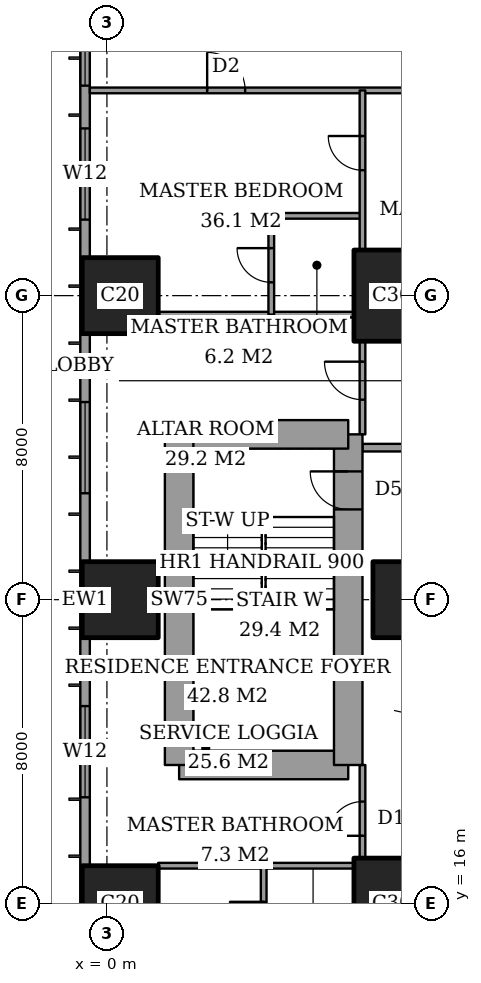
"""IFC4 building model, lengths in metres.
Left out: names, types, materials, properties, quantities, classifications, styles, units other than length and angle.
Written with IfcOpenShell. Run it as: python <this file> out.ifc"""

import sys

from ifc_helpers import new_model, si_unit, direction, frame, frame_2d, origin, origin_2d, place, context, subcontext, project, spatial, rectangle, extrude, element, fill, save


model = new_model("IFC4")
c1 = context("Model", 3, precision=1e-05, world=origin(), true_north=direction((0.0, 1.0)))
c2 = subcontext(c1, "Body", "Model", "MODEL_VIEW")
j1 = project(units=[si_unit("LENGTHUNIT", "METRE"), si_unit("PLANEANGLEUNIT", "RADIAN")], contexts=[c1])
p1 = place(None, origin())
s1 = spatial("IfcSite", under=j1, at=p1, CompositionType="ELEMENT")
p2 = place(p1, origin())
s2 = spatial("IfcBuilding", under=s1, at=p2, CompositionType="ELEMENT")
p3 = place(p2, frame((0.0, 0.0, 150.2)))
s3 = spatial("IfcBuildingStorey", under=s2, at=p3, CompositionType="ELEMENT", Elevation=150.2)
for number, where, z_axis, x_axis in (
    (1, (0.35, 16.0, 0.0), (0.0, 0.0, 1.0), (1.0, 0.0, 0.0)),
    (2, (0.35, 24.0, 0.0), (0.0, 0.0, 1.0), (1.0, 0.0, 0.0)),
    (3, (0.35, 32.0, 0.0), (0.0, 0.0, 1.0), (1.0, 0.0, 0.0)),
):
    element("IfcColumn", number, at=place(p3, frame(where, z_axis=z_axis, x_axis=x_axis)), inside=s3, PredefinedType="COLUMN", context=c2, shape_type="SweptSolid", body=[
        extrude(rectangle(XDim=2.0, YDim=2.0, at=origin_2d()), origin(), (0.0, 0.0, 1.0), 3.6),
    ])
p4 = place(p3, frame((8.0, 16.0, 0.0), z_axis=(0.0, 0.0, 1.0), x_axis=(1.0, 0.0, 0.0)))
e4 = element("IfcColumn", 4, at=p4, inside=s3, PredefinedType="COLUMN", context=c2, shape_type="SweptSolid", body=[
    extrude(rectangle(XDim=3.0, YDim=2.4, at=origin_2d()), origin(), (0.0, 0.0, 1.0), 3.6),
])
p5 = place(p3, frame((8.0, 24.0, 0.0), z_axis=(0.0, 0.0, 1.0), x_axis=(1.0, 0.0, 0.0)))
e5 = element("IfcColumn", 5, at=p5, inside=s3, PredefinedType="COLUMN", context=c2, shape_type="SweptSolid", body=[
    extrude(rectangle(XDim=2.0, YDim=2.0, at=origin_2d()), origin(), (0.0, 0.0, 1.0), 3.6),
])
p6 = place(p3, frame((8.0, 32.0, 0.0), z_axis=(0.0, 0.0, 1.0), x_axis=(1.0, 0.0, 0.0)))
e6 = element("IfcColumn", 6, at=p6, inside=s3, PredefinedType="COLUMN", context=c2, shape_type="SweptSolid", body=[
    extrude(rectangle(XDim=3.0, YDim=2.4, at=origin_2d()), origin(), (0.0, 0.0, 1.0), 3.6),
])
p7 = place(p3, frame((1.9, 19.65, 0.0), z_axis=(0.0, 0.0, 1.0), x_axis=(1.0, 0.0, 0.0)))
e7 = element("IfcWall", 7, at=p7, inside=s3, PredefinedType="SHEAR", context=c2, shape_type="SweptSolid", body=[
    extrude(rectangle(XDim=4.45, YDim=0.75, at=frame_2d((2.225, 0.0))), origin(), (0.0, 0.0, 1.0), 3.6),
])
p8 = place(p3, frame((6.35, 19.65, 0.0), z_axis=(0.0, 0.0, 1.0), x_axis=(0.0, 1.0, 0.0)))
e8 = element("IfcWall", 8, at=p8, inside=s3, PredefinedType="SHEAR", context=c2, shape_type="SweptSolid", body=[
    extrude(rectangle(XDim=8.7, YDim=0.75, at=frame_2d((4.35, 0.0))), origin(), (0.0, 0.0, 1.0), 3.6),
])
p9 = place(p8, frame((6.725, 0.0, 0.0)))
e9 = element("IfcOpeningElement", 9, at=p9, cuts=e8, PredefinedType="OPENING", context=c2, shape_type="SweptSolid", body=[
    extrude(rectangle(XDim=1.0, YDim=2.1, at=frame_2d((0.5, 1.05))), frame((0.0, 0.385, 0.0), z_axis=(0.0, -1.0, 0.0), x_axis=(1.0, 0.0, 0.0)), (0.0, 0.0, 1.0), 0.77),
])
p10 = place(p3, frame((6.35, 28.35, 0.0), z_axis=(0.0, 0.0, 1.0), x_axis=(-1.0, 0.0, 0.0)))
e10 = element("IfcWall", 10, at=p10, inside=s3, PredefinedType="SHEAR", context=c2, shape_type="SweptSolid", body=[
    extrude(rectangle(XDim=4.45, YDim=0.75, at=frame_2d((2.225, 0.0))), origin(), (0.0, 0.0, 1.0), 3.6),
])
p11 = place(p3, frame((1.9, 28.35, 0.0), z_axis=(0.0, 0.0, 1.0), x_axis=(0.0, -1.0, 0.0)))
e11 = element("IfcWall", 11, at=p11, inside=s3, PredefinedType="SHEAR", context=c2, shape_type="SweptSolid", body=[
    extrude(rectangle(XDim=8.7, YDim=0.75, at=frame_2d((4.35, 0.0))), origin(), (0.0, 0.0, 1.0), 3.6),
])
p12 = place(p3, frame((-0.575, 44.825, 0.0), z_axis=(0.0, 0.0, 1.0), x_axis=(0.0, -1.0, 0.0)))
e12 = element("IfcWall", 12, at=p12, inside=s3, PredefinedType="SOLIDWALL", context=c2, shape_type="SweptSolid", body=[
    extrude(rectangle(XDim=41.65, YDim=0.25, at=frame_2d((20.825, 0.0))), origin(), (0.0, 0.0, 1.0), 3.6),
])
p13 = place(p12, frame((0.775, 0.0, 0.4)))
e13 = element("IfcOpeningElement", 13, at=p13, cuts=e12, PredefinedType="OPENING", context=c2, shape_type="SweptSolid", body=[
    extrude(rectangle(XDim=2.4, YDim=2.2, at=frame_2d((1.2, 1.1))), frame((0.0, 0.135, 0.0), z_axis=(0.0, -1.0, 0.0), x_axis=(1.0, 0.0, 0.0)), (0.0, 0.0, 1.0), 0.27),
])
p14 = place(p12, frame((6.1, 0.0, 0.4)))
e14 = element("IfcOpeningElement", 14, at=p14, cuts=e12, PredefinedType="OPENING", context=c2, shape_type="SweptSolid", body=[
    extrude(rectangle(XDim=1.2, YDim=2.2, at=frame_2d((0.6, 1.1))), frame((0.0, 0.135, 0.0), z_axis=(0.0, -1.0, 0.0), x_axis=(1.0, 0.0, 0.0)), (0.0, 0.0, 1.0), 0.27),
])
p15 = place(p12, frame((8.425, 0.0, 0.4)))
e15 = element("IfcOpeningElement", 15, at=p15, cuts=e12, PredefinedType="OPENING", context=c2, shape_type="SweptSolid", body=[
    extrude(rectangle(XDim=2.4, YDim=2.2, at=frame_2d((1.2, 1.1))), frame((0.0, 0.135, 0.0), z_axis=(0.0, -1.0, 0.0), x_axis=(1.0, 0.0, 0.0)), (0.0, 0.0, 1.0), 0.27),
])
p16 = place(p12, frame((15.625, 0.0, 0.4)))
e16 = element("IfcOpeningElement", 16, at=p16, cuts=e12, PredefinedType="OPENING", context=c2, shape_type="SweptSolid", body=[
    extrude(rectangle(XDim=2.4, YDim=2.2, at=frame_2d((1.2, 1.1))), frame((0.0, 0.135, 0.0), z_axis=(0.0, -1.0, 0.0), x_axis=(1.0, 0.0, 0.0)), (0.0, 0.0, 1.0), 0.27),
])
p17 = place(p12, frame((23.625, 0.0, 0.4)))
e17 = element("IfcOpeningElement", 17, at=p17, cuts=e12, PredefinedType="OPENING", context=c2, shape_type="SweptSolid", body=[
    extrude(rectangle(XDim=2.4, YDim=2.2, at=frame_2d((1.2, 1.1))), frame((0.0, 0.135, 0.0), z_axis=(0.0, -1.0, 0.0), x_axis=(1.0, 0.0, 0.0)), (0.0, 0.0, 1.0), 0.27),
])
p18 = place(p12, frame((30.625, 0.0, 0.4)))
e18 = element("IfcOpeningElement", 18, at=p18, cuts=e12, PredefinedType="OPENING", context=c2, shape_type="SweptSolid", body=[
    extrude(rectangle(XDim=2.4, YDim=2.2, at=frame_2d((1.2, 1.1))), frame((0.0, 0.135, 0.0), z_axis=(0.0, -1.0, 0.0), x_axis=(1.0, 0.0, 0.0)), (0.0, 0.0, 1.0), 0.27),
])
p19 = place(p12, frame((34.225, 0.0, 0.4)))
e19 = element("IfcOpeningElement", 19, at=p19, cuts=e12, PredefinedType="OPENING", context=c2, shape_type="SweptSolid", body=[
    extrude(rectangle(XDim=1.2, YDim=2.2, at=frame_2d((0.6, 1.1))), frame((0.0, 0.135, 0.0), z_axis=(0.0, -1.0, 0.0), x_axis=(1.0, 0.0, 0.0)), (0.0, 0.0, 1.0), 0.27),
])
p20 = place(p12, frame((38.475, 0.0, 0.4)))
e20 = element("IfcOpeningElement", 20, at=p20, cuts=e12, PredefinedType="OPENING", context=c2, shape_type="SweptSolid", body=[
    extrude(rectangle(XDim=2.4, YDim=2.2, at=frame_2d((1.2, 1.1))), frame((0.0, 0.135, 0.0), z_axis=(0.0, -1.0, 0.0), x_axis=(1.0, 0.0, 0.0)), (0.0, 0.0, 1.0), 0.27),
])
p21 = place(p3, frame((1.35, 17.0, 0.0), z_axis=(0.0, 0.0, 1.0), x_axis=(1.0, 0.0, 0.0)))
e21 = element("IfcWall", 21, at=p21, inside=s3, PredefinedType="PARTITIONING", context=c2, shape_type="SweptSolid", body=[
    extrude(rectangle(XDim=5.15, YDim=0.15, at=frame_2d((2.575, 0.0))), origin(), (0.0, 0.0, 1.0), 3.35),
])
p22 = place(p3, frame((6.725, 28.0, 0.0), z_axis=(0.0, 0.0, 1.0), x_axis=(1.0, 0.0, 0.0)))
e22 = element("IfcWall", 22, at=p22, inside=s3, PredefinedType="PARTITIONING", context=c2, shape_type="SweptSolid", body=[
    extrude(rectangle(XDim=17.275, YDim=0.2, at=frame_2d((8.637, 0.0))), origin(), (0.0, 0.0, 1.0), 3.35),
])
p23 = place(p22, frame((6.475, 0.0, 0.0)))
e23 = element("IfcOpeningElement", 23, at=p23, cuts=e22, PredefinedType="OPENING", context=c2, shape_type="SweptSolid", body=[
    extrude(rectangle(XDim=1.2, YDim=2.4, at=frame_2d((0.6, 1.2))), frame((0.0, 0.11, 0.0), z_axis=(0.0, -1.0, 0.0), x_axis=(1.0, 0.0, 0.0)), (0.0, 0.0, 1.0), 0.22),
])
p24 = place(p3, frame((1.35, 31.5, 0.0), z_axis=(0.0, 0.0, 1.0), x_axis=(1.0, 0.0, 0.0)))
e24 = element("IfcWall", 24, at=p24, inside=s3, PredefinedType="PARTITIONING", context=c2, shape_type="SweptSolid", body=[
    extrude(rectangle(XDim=5.15, YDim=0.15, at=frame_2d((2.575, 0.0))), origin(), (0.0, 0.0, 1.0), 3.35),
])
p25 = place(p3, frame((4.325, 34.1, 0.0), z_axis=(0.0, 0.0, 1.0), x_axis=(1.0, 0.0, 0.0)))
e25 = element("IfcWall", 25, at=p25, inside=s3, PredefinedType="PARTITIONING", context=c2, shape_type="SweptSolid", body=[
    extrude(rectangle(XDim=2.4, YDim=0.15, at=frame_2d((1.2, 0.0))), origin(), (0.0, 0.0, 1.0), 3.35),
])
p26 = place(p3, frame((-0.45, 37.4, 0.0), z_axis=(0.0, 0.0, 1.0), x_axis=(1.0, 0.0, 0.0)))
e26 = element("IfcWall", 26, at=p26, inside=s3, PredefinedType="PARTITIONING", context=c2, shape_type="SweptSolid", body=[
    extrude(rectangle(XDim=25.011, YDim=0.15, at=frame_2d((12.505, 0.0))), origin(), (0.0, 0.0, 1.0), 3.35),
])
p27 = place(p26, frame((10.65, 0.0, 0.0)))
e27 = element("IfcOpeningElement", 27, at=p27, cuts=e26, PredefinedType="OPENING", context=c2, shape_type="SweptSolid", body=[
    extrude(rectangle(XDim=1.0, YDim=2.1, at=frame_2d((0.5, 1.05))), frame((0.0, 0.085, 0.0), z_axis=(0.0, -1.0, 0.0), x_axis=(1.0, 0.0, 0.0)), (0.0, 0.0, 1.0), 0.17),
])
p28 = place(p26, frame((3.087, 0.0, 0.0)))
e28 = element("IfcOpeningElement", 28, at=p28, cuts=e26, PredefinedType="OPENING", context=c2, shape_type="SweptSolid", body=[
    extrude(rectangle(XDim=1.0, YDim=2.1, at=frame_2d((0.5, 1.05))), frame((0.0, 0.085, 0.0), z_axis=(0.0, -1.0, 0.0), x_axis=(1.0, 0.0, 0.0)), (0.0, 0.0, 1.0), 0.17),
])
p29 = place(p26, frame((13.45, 0.0, 0.0)))
e29 = element("IfcOpeningElement", 29, at=p29, cuts=e26, PredefinedType="OPENING", context=c2, shape_type="SweptSolid", body=[
    extrude(rectangle(XDim=1.0, YDim=2.1, at=frame_2d((0.5, 1.05))), frame((0.0, 0.085, 0.0), z_axis=(0.0, -1.0, 0.0), x_axis=(1.0, 0.0, 0.0)), (0.0, 0.0, 1.0), 0.17),
])
p30 = place(p26, frame((16.55, 0.0, 0.0)))
e30 = element("IfcOpeningElement", 30, at=p30, cuts=e26, PredefinedType="OPENING", context=c2, shape_type="SweptSolid", body=[
    extrude(rectangle(XDim=1.0, YDim=2.1, at=frame_2d((0.5, 1.05))), frame((0.0, 0.085, 0.0), z_axis=(0.0, -1.0, 0.0), x_axis=(1.0, 0.0, 0.0)), (0.0, 0.0, 1.0), 0.17),
])
p31 = place(p26, frame((21.175, 0.0, 0.0)))
e31 = element("IfcOpeningElement", 31, at=p31, cuts=e26, PredefinedType="OPENING", context=c2, shape_type="SweptSolid", body=[
    extrude(rectangle(XDim=1.0, YDim=2.1, at=frame_2d((0.5, 1.05))), frame((0.0, 0.085, 0.0), z_axis=(0.0, -1.0, 0.0), x_axis=(1.0, 0.0, 0.0)), (0.0, 0.0, 1.0), 0.17),
])
p32 = place(p3, frame((4.125, 14.2, 0.0), z_axis=(0.0, 0.0, 1.0), x_axis=(0.0, 1.0, 0.0)))
e32 = element("IfcWall", 32, at=p32, inside=s3, PredefinedType="PARTITIONING", context=c2, shape_type="SweptSolid", body=[
    extrude(rectangle(XDim=2.8, YDim=0.15, at=frame_2d((1.4, 0.0))), origin(), (0.0, 0.0, 1.0), 3.35),
])
p33 = place(p32, frame((0.95, 0.0, 0.0)))
e33 = element("IfcOpeningElement", 33, at=p33, cuts=e32, PredefinedType="OPENING", context=c2, shape_type="SweptSolid", body=[
    extrude(rectangle(XDim=0.9, YDim=2.1, at=frame_2d((0.45, 1.05))), frame((0.0, 0.085, 0.0), z_axis=(0.0, -1.0, 0.0), x_axis=(1.0, 0.0, 0.0)), (0.0, 0.0, 1.0), 0.17),
])
p34 = place(p3, frame((4.325, 31.5, 0.0), z_axis=(0.0, 0.0, 1.0), x_axis=(0.0, 1.0, 0.0)))
e34 = element("IfcWall", 34, at=p34, inside=s3, PredefinedType="PARTITIONING", context=c2, shape_type="SweptSolid", body=[
    extrude(rectangle(XDim=2.6, YDim=0.15, at=frame_2d((1.3, 0.0))), origin(), (0.0, 0.0, 1.0), 3.35),
])
p35 = place(p34, frame((0.85, 0.0, 0.0)))
e35 = element("IfcOpeningElement", 35, at=p35, cuts=e34, PredefinedType="OPENING", context=c2, shape_type="SweptSolid", body=[
    extrude(rectangle(XDim=0.9, YDim=2.1, at=frame_2d((0.45, 1.05))), frame((0.0, 0.085, 0.0), z_axis=(0.0, -1.0, 0.0), x_axis=(1.0, 0.0, 0.0)), (0.0, 0.0, 1.0), 0.17),
])
p36 = place(p3, frame((6.725, 17.2, 0.0), z_axis=(0.0, 0.0, 1.0), x_axis=(0.0, 1.0, 0.0)))
e36 = element("IfcWall", 36, at=p36, inside=s3, PredefinedType="PARTITIONING", context=c2, shape_type="SweptSolid", body=[
    extrude(rectangle(XDim=2.45, YDim=0.15, at=frame_2d((1.225, 0.0))), origin(), (0.0, 0.0, 1.0), 3.35),
])
p37 = place(p36, frame((0.587, 0.0, 0.0)))
e37 = element("IfcOpeningElement", 37, at=p37, cuts=e36, PredefinedType="OPENING", context=c2, shape_type="SweptSolid", body=[
    extrude(rectangle(XDim=0.9, YDim=2.1, at=frame_2d((0.45, 1.05))), frame((0.0, 0.085, 0.0), z_axis=(0.0, -1.0, 0.0), x_axis=(1.0, 0.0, 0.0)), (0.0, 0.0, 1.0), 0.17),
])
p38 = place(p3, frame((6.725, 28.35, 0.0), z_axis=(0.0, 0.0, 1.0), x_axis=(0.0, 1.0, 0.0)))
e38 = element("IfcWall", 38, at=p38, inside=s3, PredefinedType="PARTITIONING", context=c2, shape_type="SweptSolid", body=[
    extrude(rectangle(XDim=2.45, YDim=0.15, at=frame_2d((1.225, 0.0))), origin(), (0.0, 0.0, 1.0), 3.35),
])
p39 = place(p38, frame((0.913, 0.0, 0.0)))
e39 = element("IfcOpeningElement", 39, at=p39, cuts=e38, PredefinedType="OPENING", context=c2, shape_type="SweptSolid", body=[
    extrude(rectangle(XDim=1.0, YDim=2.1, at=frame_2d((0.5, 1.05))), frame((0.0, 0.085, 0.0), z_axis=(0.0, -1.0, 0.0), x_axis=(1.0, 0.0, 0.0)), (0.0, 0.0, 1.0), 0.17),
])
p40 = place(p3, frame((6.725, 33.2, 0.0), z_axis=(0.0, 0.0, 1.0), x_axis=(0.0, 1.0, 0.0)))
e40 = element("IfcWall", 40, at=p40, inside=s3, PredefinedType="PARTITIONING", context=c2, shape_type="SweptSolid", body=[
    extrude(rectangle(XDim=4.2, YDim=0.15, at=frame_2d((2.1, 0.0))), origin(), (0.0, 0.0, 1.0), 3.35),
])
p41 = place(p40, frame((2.1, 0.0, 0.0)))
e41 = element("IfcOpeningElement", 41, at=p41, cuts=e40, PredefinedType="OPENING", context=c2, shape_type="SweptSolid", body=[
    extrude(rectangle(XDim=0.9, YDim=2.1, at=frame_2d((0.45, 1.05))), frame((0.0, 0.085, 0.0), z_axis=(0.0, -1.0, 0.0), x_axis=(1.0, 0.0, 0.0)), (0.0, 0.0, 1.0), 0.17),
])
p42 = place(p14, origin())
e42 = element("IfcWindow", 42, at=p42, inside=s3, PartitioningType="SINGLE_PANEL", PredefinedType="WINDOW", context=c2, shape_type="SweptSolid", body=[
    extrude(rectangle(XDim=1.2, YDim=2.2, at=frame_2d((0.6, 1.1))), frame((0.0, 0.03, 0.0), z_axis=(0.0, -1.0, 0.0), x_axis=(1.0, 0.0, 0.0)), (0.0, 0.0, 1.0), 0.06),
])
fill(e14, e42)
p43 = place(p15, origin())
e43 = element("IfcWindow", 43, at=p43, inside=s3, PartitioningType="SINGLE_PANEL", PredefinedType="WINDOW", context=c2, shape_type="SweptSolid", body=[
    extrude(rectangle(XDim=2.4, YDim=2.2, at=frame_2d((1.2, 1.1))), frame((0.0, 0.03, 0.0), z_axis=(0.0, -1.0, 0.0), x_axis=(1.0, 0.0, 0.0)), (0.0, 0.0, 1.0), 0.06),
])
fill(e15, e43)
p44 = place(p16, origin())
e44 = element("IfcWindow", 44, at=p44, inside=s3, PartitioningType="SINGLE_PANEL", PredefinedType="WINDOW", context=c2, shape_type="SweptSolid", body=[
    extrude(rectangle(XDim=2.4, YDim=2.2, at=frame_2d((1.2, 1.1))), frame((0.0, 0.03, 0.0), z_axis=(0.0, -1.0, 0.0), x_axis=(1.0, 0.0, 0.0)), (0.0, 0.0, 1.0), 0.06),
])
fill(e16, e44)
p45 = place(p17, origin())
e45 = element("IfcWindow", 45, at=p45, inside=s3, PartitioningType="SINGLE_PANEL", PredefinedType="WINDOW", context=c2, shape_type="SweptSolid", body=[
    extrude(rectangle(XDim=2.4, YDim=2.2, at=frame_2d((1.2, 1.1))), frame((0.0, 0.03, 0.0), z_axis=(0.0, -1.0, 0.0), x_axis=(1.0, 0.0, 0.0)), (0.0, 0.0, 1.0), 0.06),
])
fill(e17, e45)
p46 = place(p33, origin())
e46 = element("IfcDoor", 46, at=p46, inside=s3, OperationType="SINGLE_SWING_LEFT", PredefinedType="DOOR", context=c2, shape_type="SweptSolid", body=[
    extrude(rectangle(XDim=0.9, YDim=2.1, at=frame_2d((0.45, 1.05))), frame((0.0, 0.025, 0.0), z_axis=(0.0, -1.0, 0.0), x_axis=(1.0, 0.0, 0.0)), (0.0, 0.0, 1.0), 0.05),
])
fill(e33, e46)
p47 = place(p37, origin())
e47 = element("IfcDoor", 47, at=p47, inside=s3, OperationType="SINGLE_SWING_RIGHT", PredefinedType="DOOR", context=c2, shape_type="SweptSolid", body=[
    extrude(rectangle(XDim=0.9, YDim=2.1, at=frame_2d((0.45, 1.05))), frame((0.0, 0.025, 0.0), z_axis=(0.0, -1.0, 0.0), x_axis=(1.0, 0.0, 0.0)), (0.0, 0.0, 1.0), 0.05),
])
fill(e37, e47)
p48 = place(p35, origin())
e48 = element("IfcDoor", 48, at=p48, inside=s3, OperationType="SINGLE_SWING_LEFT", PredefinedType="DOOR", context=c2, shape_type="SweptSolid", body=[
    extrude(rectangle(XDim=0.9, YDim=2.1, at=frame_2d((0.45, 1.05))), frame((0.0, 0.025, 0.0), z_axis=(0.0, -1.0, 0.0), x_axis=(1.0, 0.0, 0.0)), (0.0, 0.0, 1.0), 0.05),
])
fill(e35, e48)
p49 = place(p28, origin())
e49 = element("IfcDoor", 49, at=p49, inside=s3, OperationType="SINGLE_SWING_RIGHT", PredefinedType="DOOR", context=c2, shape_type="SweptSolid", body=[
    extrude(rectangle(XDim=1.0, YDim=2.1, at=frame_2d((0.5, 1.05))), frame((0.0, 0.025, 0.0), z_axis=(0.0, -1.0, 0.0), x_axis=(1.0, 0.0, 0.0)), (0.0, 0.0, 1.0), 0.05),
])
fill(e28, e49)
p50 = place(p39, origin())
e50 = element("IfcDoor", 50, at=p50, inside=s3, OperationType="SINGLE_SWING_LEFT", PredefinedType="DOOR", context=c2, shape_type="SweptSolid", body=[
    extrude(rectangle(XDim=1.0, YDim=2.1, at=frame_2d((0.5, 1.05))), frame((0.0, 0.025, 0.0), z_axis=(0.0, -1.0, 0.0), x_axis=(1.0, 0.0, 0.0)), (0.0, 0.0, 1.0), 0.05),
])
fill(e39, e50)
p51 = place(p41, origin())
e51 = element("IfcDoor", 51, at=p51, inside=s3, OperationType="SINGLE_SWING_LEFT", PredefinedType="DOOR", context=c2, shape_type="SweptSolid", body=[
    extrude(rectangle(XDim=0.9, YDim=2.1, at=frame_2d((0.45, 1.05))), frame((0.0, 0.025, 0.0), z_axis=(0.0, -1.0, 0.0), x_axis=(1.0, 0.0, 0.0)), (0.0, 0.0, 1.0), 0.05),
])
fill(e41, e51)
p52 = place(p9, origin())
e52 = element("IfcDoor", 52, at=p52, inside=s3, OperationType="SINGLE_SWING_LEFT", PredefinedType="DOOR", context=c2, shape_type="SweptSolid", body=[
    extrude(rectangle(XDim=1.0, YDim=2.1, at=frame_2d((0.5, 1.05))), frame((0.0, 0.025, 0.0), z_axis=(0.0, -1.0, 0.0), x_axis=(1.0, 0.0, 0.0)), (0.0, 0.0, 1.0), 0.05),
])
fill(e9, e52)
save(model, sys.argv[1])
